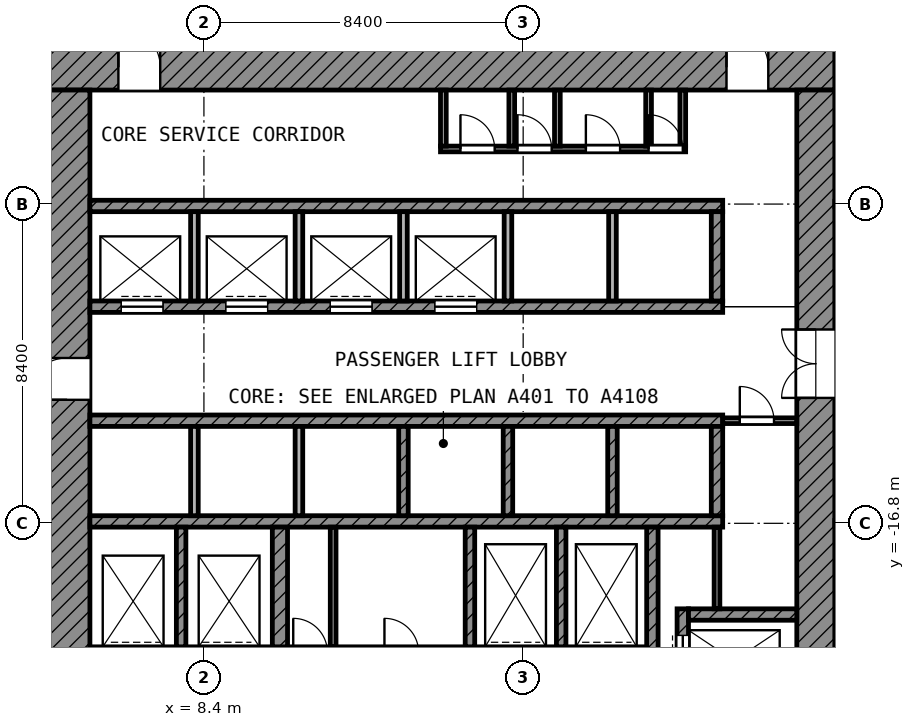
"""IFC4 building model, lengths in metres.
Left out: names, types, materials, properties, quantities, classifications, styles, units other than length and angle.
Written with IfcOpenShell. Run it as: python <this file> out.ifc"""

import sys

from ifc_helpers import new_model, si_unit, direction, frame, frame_2d, origin, place, context, subcontext, project, spatial, rectangle, extrude, element, fill, save


model = new_model("IFC4")
c1 = context("Model", 3, precision=1e-05, world=origin(), true_north=direction((0.0, 1.0)))
c2 = subcontext(c1, "Body", "Model", "MODEL_VIEW")
j1 = project(units=[si_unit("LENGTHUNIT", "METRE"), si_unit("PLANEANGLEUNIT", "RADIAN")], contexts=[c1])
p1 = place(None, origin())
s1 = spatial("IfcSite", under=j1, at=p1, CompositionType="ELEMENT")
p2 = place(p1, origin())
s2 = spatial("IfcBuilding", under=s1, at=p2, CompositionType="ELEMENT")
p3 = place(p2, frame((0.0, 0.0, 128.2)))
s3 = spatial("IfcBuildingStorey", under=s2, at=p3, CompositionType="ELEMENT", Elevation=128.2)
p4 = place(p3, frame((4.2, -4.8, 0.0), z_axis=(0.0, 0.0, 1.0), x_axis=(1.0, 0.0, 0.0)))
e1 = element("IfcWall", 1, at=p4, inside=s3, PredefinedType="SHEAR", context=c2, shape_type="SweptSolid", body=[
    extrude(rectangle(XDim=20.8, YDim=1.2, at=frame_2d((10.4, 0.0))), origin(), (0.0, 0.0, 1.0), 3.6),
])
p5 = place(p4, frame((1.95, 0.0, 0.0)))
e2 = element("IfcOpeningElement", 2, at=p5, cuts=e1, PredefinedType="OPENING", context=c2, shape_type="SweptSolid", body=[
    extrude(rectangle(XDim=1.1, YDim=2.1, at=frame_2d((0.55, 1.05))), frame((0.0, 0.61, 0.0), z_axis=(0.0, -1.0, 0.0), x_axis=(1.0, 0.0, 0.0)), (0.0, 0.0, 1.0), 1.22),
])
p6 = place(p4, frame((17.95, 0.0, 0.0)))
e3 = element("IfcOpeningElement", 3, at=p6, cuts=e1, PredefinedType="OPENING", context=c2, shape_type="SweptSolid", body=[
    extrude(rectangle(XDim=1.1, YDim=2.1, at=frame_2d((0.55, 1.05))), frame((0.0, 0.61, 0.0), z_axis=(0.0, -1.0, 0.0), x_axis=(1.0, 0.0, 0.0)), (0.0, 0.0, 1.0), 1.22),
])
p7 = place(p3, frame((4.8, -25.0, 0.0), z_axis=(0.0, 0.0, 1.0), x_axis=(0.0, 1.0, 0.0)))
e4 = element("IfcWall", 4, at=p7, inside=s3, PredefinedType="SHEAR", context=c2, shape_type="SweptSolid", body=[
    extrude(rectangle(XDim=19.6, YDim=1.2, at=frame_2d((9.8, 0.0))), origin(), (0.0, 0.0, 1.0), 3.6),
])
p8 = place(p7, frame((11.45, 0.0, 0.0)))
e5 = element("IfcOpeningElement", 5, at=p8, cuts=e4, PredefinedType="OPENING", context=c2, shape_type="SweptSolid", body=[
    extrude(rectangle(XDim=1.1, YDim=2.1, at=frame_2d((0.55, 1.05))), frame((0.0, 0.61, 0.0), z_axis=(0.0, -1.0, 0.0), x_axis=(1.0, 0.0, 0.0)), (0.0, 0.0, 1.0), 1.22),
])
p9 = place(p7, frame((2.15, 0.0, 0.0)))
e6 = element("IfcOpeningElement", 6, at=p9, cuts=e4, PredefinedType="OPENING", context=c2, shape_type="SweptSolid", body=[
    extrude(rectangle(XDim=1.1, YDim=2.1, at=frame_2d((0.55, 1.05))), frame((0.0, 0.61, 0.0), z_axis=(0.0, -1.0, 0.0), x_axis=(1.0, 0.0, 0.0)), (0.0, 0.0, 1.0), 1.22),
])
p10 = place(p3, frame((24.5, -24.0, 0.0), z_axis=(0.0, 0.0, 1.0), x_axis=(0.0, 1.0, 0.0)))
e7 = element("IfcWall", 7, at=p10, inside=s3, PredefinedType="SHEAR", context=c2, shape_type="SweptSolid", body=[
    extrude(rectangle(XDim=18.6, YDim=1.0, at=frame_2d((9.3, 0.0))), origin(), (0.0, 0.0, 1.0), 3.6),
])
p11 = place(p10, frame((10.5, 0.0, 0.0)))
e8 = element("IfcOpeningElement", 8, at=p11, cuts=e7, PredefinedType="OPENING", context=c2, shape_type="SweptSolid", body=[
    extrude(rectangle(XDim=1.8, YDim=2.1, at=frame_2d((0.9, 1.05))), frame((0.0, 0.51, 0.0), z_axis=(0.0, -1.0, 0.0), x_axis=(1.0, 0.0, 0.0)), (0.0, 0.0, 1.0), 1.02),
])
p12 = place(p3, frame((5.4, -8.45, 0.0), z_axis=(0.0, 0.0, 1.0), x_axis=(1.0, 0.0, 0.0)))
e9 = element("IfcWall", 9, at=p12, inside=s3, PredefinedType="SHEAR", context=c2, shape_type="SweptSolid", body=[
    extrude(rectangle(XDim=16.65, YDim=0.3, at=frame_2d((8.325, 0.0))), origin(), (0.0, 0.0, 1.0), 3.6),
])
p13 = place(p3, frame((5.4, -11.1, 0.0), z_axis=(0.0, 0.0, 1.0), x_axis=(1.0, 0.0, 0.0)))
e10 = element("IfcWall", 10, at=p13, inside=s3, PredefinedType="SHEAR", context=c2, shape_type="SweptSolid", body=[
    extrude(rectangle(XDim=16.65, YDim=0.3, at=frame_2d((8.325, 0.0))), origin(), (0.0, 0.0, 1.0), 3.6),
])
p14 = place(p13, frame((0.825, 0.0, 0.0)))
e11 = element("IfcOpeningElement", 11, at=p14, cuts=e10, PredefinedType="OPENING", context=c2, shape_type="SweptSolid", body=[
    extrude(rectangle(XDim=1.1, YDim=2.1, at=frame_2d((0.55, 1.05))), frame((0.0, 0.16, 0.0), z_axis=(0.0, -1.0, 0.0), x_axis=(1.0, 0.0, 0.0)), (0.0, 0.0, 1.0), 0.32),
])
p15 = place(p13, frame((3.575, 0.0, 0.0)))
e12 = element("IfcOpeningElement", 12, at=p15, cuts=e10, PredefinedType="OPENING", context=c2, shape_type="SweptSolid", body=[
    extrude(rectangle(XDim=1.1, YDim=2.1, at=frame_2d((0.55, 1.05))), frame((0.0, 0.16, 0.0), z_axis=(0.0, -1.0, 0.0), x_axis=(1.0, 0.0, 0.0)), (0.0, 0.0, 1.0), 0.32),
])
p16 = place(p13, frame((6.325, 0.0, 0.0)))
e13 = element("IfcOpeningElement", 13, at=p16, cuts=e10, PredefinedType="OPENING", context=c2, shape_type="SweptSolid", body=[
    extrude(rectangle(XDim=1.1, YDim=2.1, at=frame_2d((0.55, 1.05))), frame((0.0, 0.16, 0.0), z_axis=(0.0, -1.0, 0.0), x_axis=(1.0, 0.0, 0.0)), (0.0, 0.0, 1.0), 0.32),
])
p17 = place(p13, frame((9.075, 0.0, 0.0)))
e14 = element("IfcOpeningElement", 14, at=p17, cuts=e10, PredefinedType="OPENING", context=c2, shape_type="SweptSolid", body=[
    extrude(rectangle(XDim=1.1, YDim=2.1, at=frame_2d((0.55, 1.05))), frame((0.0, 0.16, 0.0), z_axis=(0.0, -1.0, 0.0), x_axis=(1.0, 0.0, 0.0)), (0.0, 0.0, 1.0), 0.32),
])
for number, where, z_axis, x_axis in (
    (15, (5.4, -14.1, 0.0), (0.0, 0.0, 1.0), (1.0, 0.0, 0.0)),
    (16, (5.4, -16.75, 0.0), (0.0, 0.0, 1.0), (1.0, 0.0, 0.0)),
):
    element("IfcWall", number, at=place(p3, frame(where, z_axis=z_axis, x_axis=x_axis)), inside=s3, PredefinedType="SHEAR", context=c2, shape_type="SweptSolid", body=[
        extrude(rectangle(XDim=16.65, YDim=0.3, at=frame_2d((8.325, 0.0))), origin(), (0.0, 0.0, 1.0), 3.6),
    ])
p18 = place(p3, frame((5.4, -20.2, 0.0), z_axis=(0.0, 0.0, 1.0), x_axis=(1.0, 0.0, 0.0)))
e17 = element("IfcWall", 17, at=p18, inside=s3, PredefinedType="SHEAR", context=c2, shape_type="SweptSolid", body=[
    extrude(rectangle(XDim=14.65, YDim=0.3, at=frame_2d((7.325, 0.0))), origin(), (0.0, 0.0, 1.0), 3.6),
])
p19 = place(p18, frame((10.55, 0.0, 0.0)))
e18 = element("IfcOpeningElement", 18, at=p19, cuts=e17, PredefinedType="OPENING", context=c2, shape_type="SweptSolid", body=[
    extrude(rectangle(XDim=1.3, YDim=2.1, at=frame_2d((0.65, 1.05))), frame((0.0, 0.16, 0.0), z_axis=(0.0, -1.0, 0.0), x_axis=(1.0, 0.0, 0.0)), (0.0, 0.0, 1.0), 0.32),
])
p20 = place(p18, frame((12.95, 0.0, 0.0)))
e19 = element("IfcOpeningElement", 19, at=p20, cuts=e17, PredefinedType="OPENING", context=c2, shape_type="SweptSolid", body=[
    extrude(rectangle(XDim=1.3, YDim=2.1, at=frame_2d((0.65, 1.05))), frame((0.0, 0.16, 0.0), z_axis=(0.0, -1.0, 0.0), x_axis=(1.0, 0.0, 0.0)), (0.0, 0.0, 1.0), 0.32),
])
p21 = place(p18, frame((0.55, 0.0, 0.0)))
e20 = element("IfcOpeningElement", 20, at=p21, cuts=e17, PredefinedType="OPENING", context=c2, shape_type="SweptSolid", body=[
    extrude(rectangle(XDim=1.3, YDim=2.1, at=frame_2d((0.65, 1.05))), frame((0.0, 0.16, 0.0), z_axis=(0.0, -1.0, 0.0), x_axis=(1.0, 0.0, 0.0)), (0.0, 0.0, 1.0), 0.32),
])
p22 = place(p18, frame((2.95, 0.0, 0.0)))
e21 = element("IfcOpeningElement", 21, at=p22, cuts=e17, PredefinedType="OPENING", context=c2, shape_type="SweptSolid", body=[
    extrude(rectangle(XDim=1.3, YDim=2.1, at=frame_2d((0.65, 1.05))), frame((0.0, 0.16, 0.0), z_axis=(0.0, -1.0, 0.0), x_axis=(1.0, 0.0, 0.0)), (0.0, 0.0, 1.0), 0.32),
])
p23 = place(p18, frame((5.35, 0.0, 0.0)))
e22 = element("IfcOpeningElement", 22, at=p23, cuts=e17, PredefinedType="OPENING", context=c2, shape_type="SweptSolid", body=[
    extrude(rectangle(XDim=0.9, YDim=2.1, at=frame_2d((0.45, 1.05))), frame((0.0, 0.16, 0.0), z_axis=(0.0, -1.0, 0.0), x_axis=(1.0, 0.0, 0.0)), (0.0, 0.0, 1.0), 0.32),
])
p24 = place(p18, frame((7.75, 0.0, 0.0)))
e23 = element("IfcOpeningElement", 23, at=p24, cuts=e17, PredefinedType="OPENING", context=c2, shape_type="SweptSolid", body=[
    extrude(rectangle(XDim=0.9, YDim=2.1, at=frame_2d((0.45, 1.05))), frame((0.0, 0.16, 0.0), z_axis=(0.0, -1.0, 0.0), x_axis=(1.0, 0.0, 0.0)), (0.0, 0.0, 1.0), 0.32),
])
p25 = place(p3, frame((10.4, -20.05, 0.0), z_axis=(0.0, 0.0, 1.0), x_axis=(0.0, 1.0, 0.0)))
e24 = element("IfcWall", 24, at=p25, inside=s3, PredefinedType="SHEAR", context=c2, shape_type="SweptSolid", body=[
    extrude(rectangle(XDim=3.15, YDim=0.4, at=frame_2d((1.575, 0.0))), origin(), (0.0, 0.0, 1.0), 3.6),
])
p26 = place(p3, frame((20.2, -20.35, 0.0), z_axis=(0.0, 0.0, 1.0), x_axis=(0.0, 1.0, 0.0)))
e25 = element("IfcWall", 25, at=p26, inside=s3, PredefinedType="SHEAR", context=c2, shape_type="SweptSolid", body=[
    extrude(rectangle(XDim=3.45, YDim=0.3, at=frame_2d((1.725, 0.0))), origin(), (0.0, 0.0, 1.0), 3.6),
])
p27 = place(p3, frame((21.9, -10.95, 0.0), z_axis=(0.0, 0.0, 1.0), x_axis=(0.0, 1.0, 0.0)))
e26 = element("IfcWall", 26, at=p27, inside=s3, PredefinedType="SHEAR", context=c2, shape_type="SweptSolid", body=[
    extrude(rectangle(XDim=2.35, YDim=0.3, at=frame_2d((1.175, 0.0))), origin(), (0.0, 0.0, 1.0), 3.6),
])
p28 = place(p3, frame((21.9, -16.6, 0.0), z_axis=(0.0, 0.0, 1.0), x_axis=(0.0, 1.0, 0.0)))
e27 = element("IfcWall", 27, at=p28, inside=s3, PredefinedType="SHEAR", context=c2, shape_type="SweptSolid", body=[
    extrude(rectangle(XDim=2.35, YDim=0.3, at=frame_2d((1.175, 0.0))), origin(), (0.0, 0.0, 1.0), 3.6),
])
p29 = place(p3, frame((21.15, -19.2, 0.0), z_axis=(0.0, 0.0, 1.0), x_axis=(1.0, 0.0, 0.0)))
e28 = element("IfcWall", 28, at=p29, inside=s3, PredefinedType="SHEAR", context=c2, shape_type="SweptSolid", body=[
    extrude(rectangle(XDim=2.85, YDim=0.3, at=frame_2d((1.425, 0.0))), origin(), (0.0, 0.0, 1.0), 3.6),
])
p30 = place(p3, frame((21.0, -24.0, 0.0), z_axis=(0.0, 0.0, 1.0), x_axis=(0.0, 1.0, 0.0)))
e29 = element("IfcWall", 29, at=p30, inside=s3, PredefinedType="SHEAR", context=c2, shape_type="SweptSolid", body=[
    extrude(rectangle(XDim=4.95, YDim=0.3, at=frame_2d((2.475, 0.0))), origin(), (0.0, 0.0, 1.0), 3.6),
])
p31 = place(p30, frame((2.95, 0.0, 0.0)))
e30 = element("IfcOpeningElement", 30, at=p31, cuts=e29, PredefinedType="OPENING", context=c2, shape_type="SweptSolid", body=[
    extrude(rectangle(XDim=1.3, YDim=2.1, at=frame_2d((0.65, 1.05))), frame((0.0, 0.16, 0.0), z_axis=(0.0, -1.0, 0.0), x_axis=(1.0, 0.0, 0.0)), (0.0, 0.0, 1.0), 0.32),
])
p32 = place(p30, frame((0.55, 0.0, 0.0)))
e31 = element("IfcOpeningElement", 31, at=p32, cuts=e29, PredefinedType="OPENING", context=c2, shape_type="SweptSolid", body=[
    extrude(rectangle(XDim=1.3, YDim=2.1, at=frame_2d((0.65, 1.05))), frame((0.0, 0.16, 0.0), z_axis=(0.0, -1.0, 0.0), x_axis=(1.0, 0.0, 0.0)), (0.0, 0.0, 1.0), 0.32),
])
for number, where, z_axis, x_axis in (
    (32, (7.8, -20.05, 0.0), (0.0, 0.0, 1.0), (0.0, 1.0, 0.0)),
    (33, (15.4, -20.05, 0.0), (0.0, 0.0, 1.0), (0.0, 1.0, 0.0)),
    (34, (17.8, -20.05, 0.0), (0.0, 0.0, 1.0), (0.0, 1.0, 0.0)),
):
    element("IfcWall", number, at=place(p3, frame(where, z_axis=z_axis, x_axis=x_axis)), inside=s3, PredefinedType="SHEAR", context=c2, shape_type="SweptSolid", body=[
        extrude(rectangle(XDim=3.15, YDim=0.25, at=frame_2d((1.575, 0.0))), origin(), (0.0, 0.0, 1.0), 3.6),
    ])
for number, where, z_axis, x_axis in (
    (35, (8.15, -10.95, 0.0), (0.0, 0.0, 1.0), (0.0, 1.0, 0.0)),
    (36, (10.9, -10.95, 0.0), (0.0, 0.0, 1.0), (0.0, 1.0, 0.0)),
    (37, (13.65, -10.95, 0.0), (0.0, 0.0, 1.0), (0.0, 1.0, 0.0)),
    (38, (16.4, -10.95, 0.0), (0.0, 0.0, 1.0), (0.0, 1.0, 0.0)),
    (39, (19.15, -10.95, 0.0), (0.0, 0.0, 1.0), (0.0, 1.0, 0.0)),
):
    element("IfcWall", number, at=place(p3, frame(where, z_axis=z_axis, x_axis=x_axis)), inside=s3, PredefinedType="PARTITIONING", context=c2, shape_type="SweptSolid", body=[
        extrude(rectangle(XDim=2.35, YDim=0.2, at=frame_2d((1.175, 0.0))), origin(), (0.0, 0.0, 1.0), 3.6),
    ])
for number, where, z_axis, x_axis in (
    (40, (8.15, -16.6, 0.0), (0.0, 0.0, 1.0), (0.0, 1.0, 0.0)),
    (41, (10.9, -16.6, 0.0), (0.0, 0.0, 1.0), (0.0, 1.0, 0.0)),
):
    element("IfcWall", number, at=place(p3, frame(where, z_axis=z_axis, x_axis=x_axis)), inside=s3, PredefinedType="PARTITIONING", context=c2, shape_type="SweptSolid", body=[
        extrude(rectangle(XDim=2.35, YDim=0.2, at=frame_2d((1.175, 0.0))), origin(), (0.0, 0.0, 1.0), 3.6),
    ])
for number, where, z_axis, x_axis in (
    (42, (13.65, -16.6, 0.0), (0.0, 0.0, 1.0), (0.0, 1.0, 0.0)),
    (43, (16.4, -16.6, 0.0), (0.0, 0.0, 1.0), (0.0, 1.0, 0.0)),
    (44, (19.15, -16.6, 0.0), (0.0, 0.0, 1.0), (0.0, 1.0, 0.0)),
):
    element("IfcWall", number, at=place(p3, frame(where, z_axis=z_axis, x_axis=x_axis)), inside=s3, PredefinedType="SHEAR", context=c2, shape_type="SweptSolid", body=[
        extrude(rectangle(XDim=2.35, YDim=0.25, at=frame_2d((1.175, 0.0))), origin(), (0.0, 0.0, 1.0), 3.6),
    ])
p33 = place(p3, frame((21.9, -19.05, 0.0), z_axis=(0.0, 0.0, 1.0), x_axis=(0.0, 1.0, 0.0)))
e45 = element("IfcWall", 45, at=p33, inside=s3, PredefinedType="PARTITIONING", context=c2, shape_type="SweptSolid", body=[
    extrude(rectangle(XDim=2.15, YDim=0.15, at=frame_2d((1.075, 0.0))), origin(), (0.0, 0.0, 1.0), 3.6),
])
p34 = place(p3, frame((22.05, -14.1, 0.0), z_axis=(0.0, 0.0, 1.0), x_axis=(1.0, 0.0, 0.0)))
e46 = element("IfcWall", 46, at=p34, inside=s3, PredefinedType="PARTITIONING", context=c2, shape_type="SweptSolid", body=[
    extrude(rectangle(XDim=1.95, YDim=0.15, at=frame_2d((0.975, 0.0))), origin(), (0.0, 0.0, 1.0), 3.6),
])
p35 = place(p34, frame((0.45, 0.0, 0.0)))
e47 = element("IfcOpeningElement", 47, at=p35, cuts=e46, PredefinedType="OPENING", context=c2, shape_type="SweptSolid", body=[
    extrude(rectangle(XDim=0.9, YDim=2.1, at=frame_2d((0.45, 1.05))), frame((0.0, 0.085, 0.0), z_axis=(0.0, -1.0, 0.0), x_axis=(1.0, 0.0, 0.0)), (0.0, 0.0, 1.0), 0.17),
])
p36 = place(p3, frame((14.625, -6.95, 0.0), z_axis=(0.0, 0.0, 1.0), x_axis=(1.0, 0.0, 0.0)))
e48 = element("IfcWall", 48, at=p36, inside=s3, PredefinedType="PARTITIONING", context=c2, shape_type="SweptSolid", body=[
    extrude(rectangle(XDim=6.45, YDim=0.15, at=frame_2d((3.225, 0.0))), origin(), (0.0, 0.0, 1.0), 3.6),
])
p37 = place(p36, frame((0.525, 0.0, 0.0)))
e49 = element("IfcOpeningElement", 49, at=p37, cuts=e48, PredefinedType="OPENING", context=c2, shape_type="SweptSolid", body=[
    extrude(rectangle(XDim=0.9, YDim=2.1, at=frame_2d((0.45, 1.05))), frame((0.0, 0.085, 0.0), z_axis=(0.0, -1.0, 0.0), x_axis=(1.0, 0.0, 0.0)), (0.0, 0.0, 1.0), 0.17),
])
p38 = place(p36, frame((2.025, 0.0, 0.0)))
e50 = element("IfcOpeningElement", 50, at=p38, cuts=e48, PredefinedType="OPENING", context=c2, shape_type="SweptSolid", body=[
    extrude(rectangle(XDim=0.9, YDim=2.1, at=frame_2d((0.45, 1.05))), frame((0.0, 0.085, 0.0), z_axis=(0.0, -1.0, 0.0), x_axis=(1.0, 0.0, 0.0)), (0.0, 0.0, 1.0), 0.17),
])
p39 = place(p36, frame((3.825, 0.0, 0.0)))
e51 = element("IfcOpeningElement", 51, at=p39, cuts=e48, PredefinedType="OPENING", context=c2, shape_type="SweptSolid", body=[
    extrude(rectangle(XDim=0.9, YDim=2.1, at=frame_2d((0.45, 1.05))), frame((0.0, 0.085, 0.0), z_axis=(0.0, -1.0, 0.0), x_axis=(1.0, 0.0, 0.0)), (0.0, 0.0, 1.0), 0.17),
])
p40 = place(p36, frame((5.475, 0.0, 0.0)))
e52 = element("IfcOpeningElement", 52, at=p40, cuts=e48, PredefinedType="OPENING", context=c2, shape_type="SweptSolid", body=[
    extrude(rectangle(XDim=0.9, YDim=2.1, at=frame_2d((0.45, 1.05))), frame((0.0, 0.085, 0.0), z_axis=(0.0, -1.0, 0.0), x_axis=(1.0, 0.0, 0.0)), (0.0, 0.0, 1.0), 0.17),
])
p41 = place(p3, frame((11.8, -20.05, 0.0), z_axis=(0.0, 0.0, 1.0), x_axis=(0.0, 1.0, 0.0)))
e53 = element("IfcWall", 53, at=p41, inside=s3, PredefinedType="PARTITIONING", context=c2, shape_type="SweptSolid", body=[
    extrude(rectangle(XDim=3.15, YDim=0.15, at=frame_2d((1.575, 0.0))), origin(), (0.0, 0.0, 1.0), 3.6),
])
for number, where, z_axis, x_axis in (
    (54, (14.7, -6.875, 0.0), (0.0, 0.0, 1.0), (0.0, 1.0, 0.0)),
    (55, (16.5, -6.875, 0.0), (0.0, 0.0, 1.0), (0.0, 1.0, 0.0)),
    (56, (17.7, -6.875, 0.0), (0.0, 0.0, 1.0), (0.0, 1.0, 0.0)),
    (57, (20.1, -6.875, 0.0), (0.0, 0.0, 1.0), (0.0, 1.0, 0.0)),
    (58, (21.0, -6.875, 0.0), (0.0, 0.0, 1.0), (0.0, 1.0, 0.0)),
):
    element("IfcWall", number, at=place(p3, frame(where, z_axis=z_axis, x_axis=x_axis)), inside=s3, PredefinedType="PARTITIONING", context=c2, shape_type="SweptSolid", body=[
        extrude(rectangle(XDim=1.475, YDim=0.15, at=frame_2d((0.738, 0.0))), origin(), (0.0, 0.0, 1.0), 3.6),
    ])
p42 = place(p14, origin())
e59 = element("IfcDoor", 59, at=p42, inside=s3, OperationType="DOUBLE_DOOR_SLIDING", PredefinedType="DOOR", context=c2, shape_type="SweptSolid", body=[
    extrude(rectangle(XDim=1.1, YDim=2.1, at=frame_2d((0.55, 1.05))), frame((0.0, 0.025, 0.0), z_axis=(0.0, -1.0, 0.0), x_axis=(1.0, 0.0, 0.0)), (0.0, 0.0, 1.0), 0.05),
])
fill(e11, e59)
p43 = place(p15, origin())
e60 = element("IfcDoor", 60, at=p43, inside=s3, OperationType="DOUBLE_DOOR_SLIDING", PredefinedType="DOOR", context=c2, shape_type="SweptSolid", body=[
    extrude(rectangle(XDim=1.1, YDim=2.1, at=frame_2d((0.55, 1.05))), frame((0.0, 0.025, 0.0), z_axis=(0.0, -1.0, 0.0), x_axis=(1.0, 0.0, 0.0)), (0.0, 0.0, 1.0), 0.05),
])
fill(e12, e60)
p44 = place(p16, origin())
e61 = element("IfcDoor", 61, at=p44, inside=s3, OperationType="DOUBLE_DOOR_SLIDING", PredefinedType="DOOR", context=c2, shape_type="SweptSolid", body=[
    extrude(rectangle(XDim=1.1, YDim=2.1, at=frame_2d((0.55, 1.05))), frame((0.0, 0.025, 0.0), z_axis=(0.0, -1.0, 0.0), x_axis=(1.0, 0.0, 0.0)), (0.0, 0.0, 1.0), 0.05),
])
fill(e13, e61)
p45 = place(p17, origin())
e62 = element("IfcDoor", 62, at=p45, inside=s3, OperationType="DOUBLE_DOOR_SLIDING", PredefinedType="DOOR", context=c2, shape_type="SweptSolid", body=[
    extrude(rectangle(XDim=1.1, YDim=2.1, at=frame_2d((0.55, 1.05))), frame((0.0, 0.025, 0.0), z_axis=(0.0, -1.0, 0.0), x_axis=(1.0, 0.0, 0.0)), (0.0, 0.0, 1.0), 0.05),
])
fill(e14, e62)
p46 = place(p31, origin())
e63 = element("IfcDoor", 63, at=p46, inside=s3, OperationType="DOUBLE_DOOR_SLIDING", PredefinedType="DOOR", context=c2, shape_type="SweptSolid", body=[
    extrude(rectangle(XDim=1.3, YDim=2.1, at=frame_2d((0.65, 1.05))), frame((0.0, 0.025, 0.0), z_axis=(0.0, -1.0, 0.0), x_axis=(1.0, 0.0, 0.0)), (0.0, 0.0, 1.0), 0.05),
])
fill(e30, e63)
p47 = place(p8, origin())
e64 = element("IfcDoor", 64, at=p47, inside=s3, OperationType="SINGLE_SWING_LEFT", PredefinedType="DOOR", context=c2, shape_type="SweptSolid", body=[
    extrude(rectangle(XDim=1.1, YDim=2.1, at=frame_2d((0.55, 1.05))), frame((0.0, 0.025, 0.0), z_axis=(0.0, -1.0, 0.0), x_axis=(1.0, 0.0, 0.0)), (0.0, 0.0, 1.0), 0.05),
])
fill(e5, e64)
p48 = place(p5, origin())
e65 = element("IfcDoor", 65, at=p48, inside=s3, OperationType="SINGLE_SWING_LEFT", PredefinedType="DOOR", context=c2, shape_type="SweptSolid", body=[
    extrude(rectangle(XDim=1.1, YDim=2.1, at=frame_2d((0.55, 1.05))), frame((0.0, 0.025, 0.0), z_axis=(0.0, -1.0, 0.0), x_axis=(1.0, 0.0, 0.0)), (0.0, 0.0, 1.0), 0.05),
])
fill(e2, e65)
p49 = place(p6, origin())
e66 = element("IfcDoor", 66, at=p49, inside=s3, OperationType="SINGLE_SWING_LEFT", PredefinedType="DOOR", context=c2, shape_type="SweptSolid", body=[
    extrude(rectangle(XDim=1.1, YDim=2.1, at=frame_2d((0.55, 1.05))), frame((0.0, 0.025, 0.0), z_axis=(0.0, -1.0, 0.0), x_axis=(1.0, 0.0, 0.0)), (0.0, 0.0, 1.0), 0.05),
])
fill(e3, e66)
p50 = place(p11, origin())
e67 = element("IfcDoor", 67, at=p50, inside=s3, OperationType="DOUBLE_DOOR_SINGLE_SWING", PredefinedType="DOOR", context=c2, shape_type="SweptSolid", body=[
    extrude(rectangle(XDim=1.8, YDim=2.1, at=frame_2d((0.9, 1.05))), frame((0.0, 0.025, 0.0), z_axis=(0.0, -1.0, 0.0), x_axis=(1.0, 0.0, 0.0)), (0.0, 0.0, 1.0), 0.05),
])
fill(e8, e67)
p51 = place(p37, origin())
e68 = element("IfcDoor", 68, at=p51, inside=s3, OperationType="SINGLE_SWING_LEFT", PredefinedType="DOOR", context=c2, shape_type="SweptSolid", body=[
    extrude(rectangle(XDim=0.9, YDim=2.1, at=frame_2d((0.45, 1.05))), frame((0.0, 0.025, 0.0), z_axis=(0.0, -1.0, 0.0), x_axis=(1.0, 0.0, 0.0)), (0.0, 0.0, 1.0), 0.05),
])
fill(e49, e68)
p52 = place(p38, origin())
e69 = element("IfcDoor", 69, at=p52, inside=s3, OperationType="SINGLE_SWING_LEFT", PredefinedType="DOOR", context=c2, shape_type="SweptSolid", body=[
    extrude(rectangle(XDim=0.9, YDim=2.1, at=frame_2d((0.45, 1.05))), frame((0.0, 0.025, 0.0), z_axis=(0.0, -1.0, 0.0), x_axis=(1.0, 0.0, 0.0)), (0.0, 0.0, 1.0), 0.05),
])
fill(e50, e69)
p53 = place(p39, origin())
e70 = element("IfcDoor", 70, at=p53, inside=s3, OperationType="SINGLE_SWING_LEFT", PredefinedType="DOOR", context=c2, shape_type="SweptSolid", body=[
    extrude(rectangle(XDim=0.9, YDim=2.1, at=frame_2d((0.45, 1.05))), frame((0.0, 0.025, 0.0), z_axis=(0.0, -1.0, 0.0), x_axis=(1.0, 0.0, 0.0)), (0.0, 0.0, 1.0), 0.05),
])
fill(e51, e70)
p54 = place(p40, origin())
e71 = element("IfcDoor", 71, at=p54, inside=s3, OperationType="SINGLE_SWING_LEFT", PredefinedType="DOOR", context=c2, shape_type="SweptSolid", body=[
    extrude(rectangle(XDim=0.9, YDim=2.1, at=frame_2d((0.45, 1.05))), frame((0.0, 0.025, 0.0), z_axis=(0.0, -1.0, 0.0), x_axis=(1.0, 0.0, 0.0)), (0.0, 0.0, 1.0), 0.05),
])
fill(e52, e71)
p55 = place(p35, origin())
e72 = element("IfcDoor", 72, at=p55, inside=s3, OperationType="SINGLE_SWING_LEFT", PredefinedType="DOOR", context=c2, shape_type="SweptSolid", body=[
    extrude(rectangle(XDim=0.9, YDim=2.1, at=frame_2d((0.45, 1.05))), frame((0.0, 0.025, 0.0), z_axis=(0.0, -1.0, 0.0), x_axis=(1.0, 0.0, 0.0)), (0.0, 0.0, 1.0), 0.05),
])
fill(e47, e72)
save(model, sys.argv[1])
